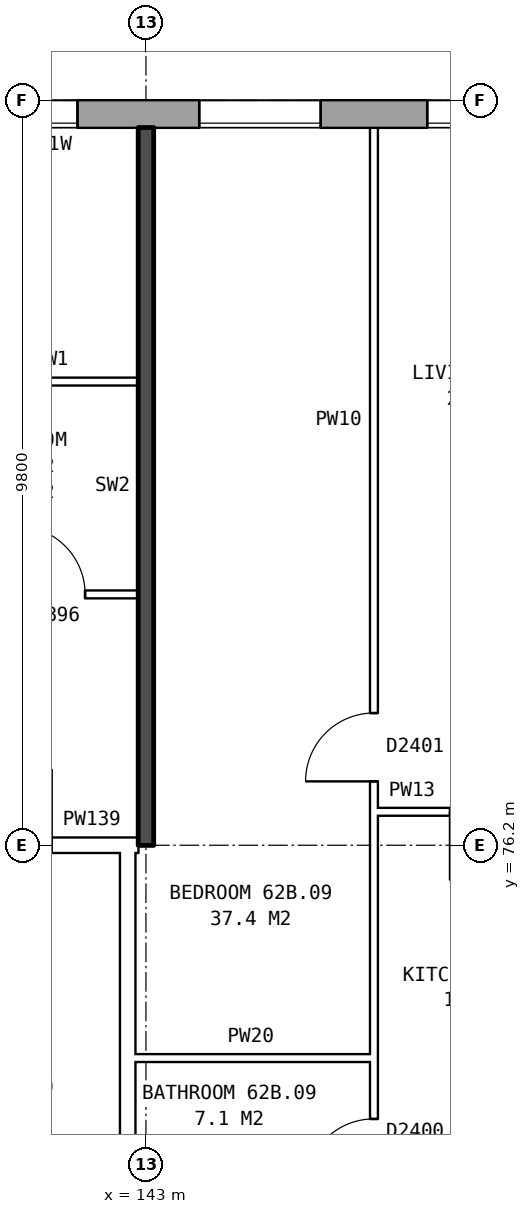
"""IFC4 building model, lengths in metres.
Left out: names, types, materials, properties, quantities, classifications, styles, units other than length and angle.
Written with IfcOpenShell. Run it as: python <this file> out.ifc"""

import sys

from ifc_helpers import new_model, si_unit, direction, frame, frame_2d, origin, place, context, subcontext, project, spatial, rectangle, extrude, element, fill, save


model = new_model("IFC4")
c1 = context("Model", 3, precision=1e-05, world=origin(), true_north=direction((0.0, 1.0)))
c2 = subcontext(c1, "Body", "Model", "MODEL_VIEW")
j1 = project(units=[si_unit("LENGTHUNIT", "METRE"), si_unit("PLANEANGLEUNIT", "RADIAN")], contexts=[c1])
p1 = place(None, origin())
s1 = spatial("IfcSite", under=j1, at=p1, CompositionType="ELEMENT")
p2 = place(p1, origin())
s2 = spatial("IfcBuilding", under=s1, at=p2, CompositionType="ELEMENT")
p3 = place(p2, frame((0.0, 0.0, 221.4)))
s3 = spatial("IfcBuildingStorey", under=s2, at=p3, CompositionType="ELEMENT", Elevation=221.4)
p4 = place(p3, frame((165.925, 85.82, 0.0), z_axis=(0.0, 0.0, 1.0), x_axis=(-1.0, 0.0, 0.0)))
e1 = element("IfcWall", 1, at=p4, inside=s3, PredefinedType="STANDARD", context=c2, shape_type="SweptSolid", body=[
    extrude(rectangle(XDim=33.875, YDim=0.36, at=frame_2d((16.938, 0.0))), origin(), (0.0, 0.0, 1.0), 2.85),
])
p5 = place(p4, frame((2.625, 0.0, 0.8)))
e2 = element("IfcOpeningElement", 2, at=p5, cuts=e1, PredefinedType="OPENING", context=c2, shape_type="SweptSolid", body=[
    extrude(rectangle(XDim=1.6, YDim=1.8, at=frame_2d((0.8, 0.9))), frame((0.0, 0.19, 0.0), z_axis=(0.0, -1.0, 0.0), x_axis=(1.0, 0.0, 0.0)), (0.0, 0.0, 1.0), 0.38),
])
p6 = place(p4, frame((5.625, 0.0, 0.8)))
e3 = element("IfcOpeningElement", 3, at=p6, cuts=e1, PredefinedType="OPENING", context=c2, shape_type="SweptSolid", body=[
    extrude(rectangle(XDim=1.6, YDim=1.8, at=frame_2d((0.8, 0.9))), frame((0.0, 0.19, 0.0), z_axis=(0.0, -1.0, 0.0), x_axis=(1.0, 0.0, 0.0)), (0.0, 0.0, 1.0), 0.38),
])
p7 = place(p4, frame((9.625, 0.0, 0.8)))
e4 = element("IfcOpeningElement", 4, at=p7, cuts=e1, PredefinedType="OPENING", context=c2, shape_type="SweptSolid", body=[
    extrude(rectangle(XDim=1.0, YDim=1.8, at=frame_2d((0.5, 0.9))), frame((0.0, 0.19, 0.0), z_axis=(0.0, -1.0, 0.0), x_axis=(1.0, 0.0, 0.0)), (0.0, 0.0, 1.0), 0.38),
])
p8 = place(p4, frame((11.625, 0.0, 0.8)))
e5 = element("IfcOpeningElement", 5, at=p8, cuts=e1, PredefinedType="OPENING", context=c2, shape_type="SweptSolid", body=[
    extrude(rectangle(XDim=1.6, YDim=1.8, at=frame_2d((0.8, 0.9))), frame((0.0, 0.19, 0.0), z_axis=(0.0, -1.0, 0.0), x_axis=(1.0, 0.0, 0.0)), (0.0, 0.0, 1.0), 0.38),
])
p9 = place(p4, frame((14.625, 0.0, 0.8)))
e6 = element("IfcOpeningElement", 6, at=p9, cuts=e1, PredefinedType="OPENING", context=c2, shape_type="SweptSolid", body=[
    extrude(rectangle(XDim=1.6, YDim=1.8, at=frame_2d((0.8, 0.9))), frame((0.0, 0.19, 0.0), z_axis=(0.0, -1.0, 0.0), x_axis=(1.0, 0.0, 0.0)), (0.0, 0.0, 1.0), 0.38),
])
p10 = place(p4, frame((17.625, 0.0, 0.8)))
e7 = element("IfcOpeningElement", 7, at=p10, cuts=e1, PredefinedType="OPENING", context=c2, shape_type="SweptSolid", body=[
    extrude(rectangle(XDim=1.6, YDim=1.8, at=frame_2d((0.8, 0.9))), frame((0.0, 0.19, 0.0), z_axis=(0.0, -1.0, 0.0), x_axis=(1.0, 0.0, 0.0)), (0.0, 0.0, 1.0), 0.38),
])
p11 = place(p4, frame((20.625, 0.0, 0.8)))
e8 = element("IfcOpeningElement", 8, at=p11, cuts=e1, PredefinedType="OPENING", context=c2, shape_type="SweptSolid", body=[
    extrude(rectangle(XDim=1.6, YDim=1.8, at=frame_2d((0.8, 0.9))), frame((0.0, 0.19, 0.0), z_axis=(0.0, -1.0, 0.0), x_axis=(1.0, 0.0, 0.0)), (0.0, 0.0, 1.0), 0.38),
])
p12 = place(p4, frame((23.825, 0.0, 1.7)))
e9 = element("IfcOpeningElement", 9, at=p12, cuts=e1, PredefinedType="OPENING", context=c2, shape_type="SweptSolid", body=[
    extrude(rectangle(XDim=0.6, YDim=0.9, at=frame_2d((0.3, 0.45))), frame((0.0, 0.19, 0.0), z_axis=(0.0, -1.0, 0.0), x_axis=(1.0, 0.0, 0.0)), (0.0, 0.0, 1.0), 0.38),
])
p13 = place(p4, frame((26.625, 0.0, 0.8)))
e10 = element("IfcOpeningElement", 10, at=p13, cuts=e1, PredefinedType="OPENING", context=c2, shape_type="SweptSolid", body=[
    extrude(rectangle(XDim=1.6, YDim=1.8, at=frame_2d((0.8, 0.9))), frame((0.0, 0.19, 0.0), z_axis=(0.0, -1.0, 0.0), x_axis=(1.0, 0.0, 0.0)), (0.0, 0.0, 1.0), 0.38),
])
p14 = place(p4, frame((29.625, 0.0, 0.8)))
e11 = element("IfcOpeningElement", 11, at=p14, cuts=e1, PredefinedType="OPENING", context=c2, shape_type="SweptSolid", body=[
    extrude(rectangle(XDim=1.6, YDim=1.8, at=frame_2d((0.8, 0.9))), frame((0.0, 0.19, 0.0), z_axis=(0.0, -1.0, 0.0), x_axis=(1.0, 0.0, 0.0)), (0.0, 0.0, 1.0), 0.38),
])
p15 = place(p4, frame((24.725, 0.0, 0.8)))
e12 = element("IfcOpeningElement", 12, at=p15, cuts=e1, PredefinedType="OPENING", context=c2, shape_type="SweptSolid", body=[
    extrude(rectangle(XDim=1.6, YDim=1.8, at=frame_2d((0.8, 0.9))), frame((0.0, 0.19, 0.0), z_axis=(0.0, -1.0, 0.0), x_axis=(1.0, 0.0, 0.0)), (0.0, 0.0, 1.0), 0.38),
])
p16 = place(p3, frame((142.76, 63.9, 0.0), z_axis=(0.0, 0.0, 1.0), x_axis=(0.0, 1.0, 0.0)))
e13 = element("IfcWall", 13, at=p16, inside=s3, PredefinedType="PARTITIONING", context=c2, shape_type="SweptSolid", body=[
    extrude(rectangle(XDim=12.2, YDim=0.2, at=frame_2d((6.1, 0.0))), origin(), (0.0, 0.0, 1.0), 2.85),
])
p17 = place(p16, frame((5.1, 0.0, 0.0)))
e14 = element("IfcOpeningElement", 14, at=p17, cuts=e13, PredefinedType="OPENING", context=c2, shape_type="SweptSolid", body=[
    extrude(rectangle(XDim=2.0, YDim=2.1, at=frame_2d((1.0, 1.05))), frame((0.0, 0.11, 0.0), z_axis=(0.0, -1.0, 0.0), x_axis=(1.0, 0.0, 0.0)), (0.0, 0.0, 1.0), 0.22),
])
p18 = place(p3, frame((142.76, 73.4, 0.0), z_axis=(0.0, 0.0, 1.0), x_axis=(1.0, 0.0, 0.0)))
e15 = element("IfcWall", 15, at=p18, inside=s3, PredefinedType="PARTITIONING", context=c2, shape_type="SweptSolid", body=[
    extrude(rectangle(XDim=3.24, YDim=0.1, at=frame_2d((1.62, 0.0))), origin(), (0.0, 0.0, 1.0), 2.85),
])
p19 = place(p3, frame((139.76, 76.2, 0.0), z_axis=(0.0, 0.0, 1.0), x_axis=(1.0, 0.0, 0.0)))
e16 = element("IfcWall", 16, at=p19, inside=s3, PredefinedType="PARTITIONING", context=c2, shape_type="SweptSolid", body=[
    extrude(rectangle(XDim=3.0, YDim=0.2, at=frame_2d((1.5, 0.0))), origin(), (0.0, 0.0, 1.0), 2.85),
])
p20 = place(p19, frame((1.0, 0.0, 0.0)))
e17 = element("IfcOpeningElement", 17, at=p20, cuts=e16, PredefinedType="OPENING", context=c2, shape_type="SweptSolid", body=[
    extrude(rectangle(XDim=1.0, YDim=2.1, at=frame_2d((0.5, 1.05))), frame((0.0, 0.11, 0.0), z_axis=(0.0, -1.0, 0.0), x_axis=(1.0, 0.0, 0.0)), (0.0, 0.0, 1.0), 0.22),
])
p21 = place(p3, frame((142.76, 76.2, 0.0), z_axis=(0.0, 0.0, 1.0), x_axis=(1.0, 0.0, 0.0)))
e18 = element("IfcWall", 18, at=p21, inside=s3, PredefinedType="PARTITIONING", context=c2, shape_type="SweptSolid", body=[
    extrude(rectangle(XDim=0.14, YDim=0.2, at=frame_2d((0.07, 0.0))), origin(), (0.0, 0.0, 1.0), 2.85),
])
p22 = place(p3, frame((146.0, 76.64, 0.0), z_axis=(0.0, 0.0, 1.0), x_axis=(1.0, 0.0, 0.0)))
e19 = element("IfcWall", 19, at=p22, inside=s3, PredefinedType="PARTITIONING", context=c2, shape_type="SweptSolid", body=[
    extrude(rectangle(XDim=2.9, YDim=0.1, at=frame_2d((1.45, 0.0))), origin(), (0.0, 0.0, 1.0), 2.85),
])
p23 = place(p22, frame((1.0, 0.0, 0.0)))
e20 = element("IfcOpeningElement", 20, at=p23, cuts=e19, PredefinedType="OPENING", context=c2, shape_type="SweptSolid", body=[
    extrude(rectangle(XDim=0.9, YDim=2.1, at=frame_2d((0.45, 1.05))), frame((0.0, 0.06, 0.0), z_axis=(0.0, -1.0, 0.0), x_axis=(1.0, 0.0, 0.0)), (0.0, 0.0, 1.0), 0.12),
])
p24 = place(p3, frame((131.1, 79.5, 0.0), z_axis=(0.0, 0.0, 1.0), x_axis=(1.0, 0.0, 0.0)))
e21 = element("IfcWall", 21, at=p24, inside=s3, PredefinedType="PARTITIONING", context=c2, shape_type="SweptSolid", body=[
    extrude(rectangle(XDim=11.8, YDim=0.1, at=frame_2d((5.9, 0.0))), origin(), (0.0, 0.0, 1.0), 2.85),
])
p25 = place(p24, frame((7.25, 0.0, 0.0)))
e22 = element("IfcOpeningElement", 22, at=p25, cuts=e21, PredefinedType="OPENING", context=c2, shape_type="SweptSolid", body=[
    extrude(rectangle(XDim=0.9, YDim=2.1, at=frame_2d((0.45, 1.05))), frame((0.0, 0.06, 0.0), z_axis=(0.0, -1.0, 0.0), x_axis=(1.0, 0.0, 0.0)), (0.0, 0.0, 1.0), 0.12),
])
p26 = place(p24, frame((10.2, 0.0, 0.0)))
e23 = element("IfcOpeningElement", 23, at=p26, cuts=e21, PredefinedType="OPENING", context=c2, shape_type="SweptSolid", body=[
    extrude(rectangle(XDim=0.9, YDim=2.1, at=frame_2d((0.45, 1.05))), frame((0.0, 0.06, 0.0), z_axis=(0.0, -1.0, 0.0), x_axis=(1.0, 0.0, 0.0)), (0.0, 0.0, 1.0), 0.12),
])
p27 = place(p3, frame((140.6, 82.3, 0.0), z_axis=(0.0, 0.0, 1.0), x_axis=(1.0, 0.0, 0.0)))
e24 = element("IfcWall", 24, at=p27, inside=s3, PredefinedType="PARTITIONING", context=c2, shape_type="SweptSolid", body=[
    extrude(rectangle(XDim=2.3, YDim=0.1, at=frame_2d((1.15, 0.0))), origin(), (0.0, 0.0, 1.0), 2.85),
])
p28 = place(p3, frame((143.0, 76.2, 0.0), z_axis=(0.0, 0.0, 1.0), x_axis=(0.0, 1.0, 0.0)))
e25 = element("IfcWall", 25, at=p28, inside=s3, PredefinedType="SOLIDWALL", context=c2, shape_type="SweptSolid", body=[
    extrude(rectangle(XDim=9.44, YDim=0.2, at=frame_2d((4.72, 0.0))), origin(), (0.0, 0.0, 1.0), 2.85),
])
p29 = place(p3, frame((146.0, 71.3, 0.0), z_axis=(0.0, 0.0, 1.0), x_axis=(0.0, 1.0, 0.0)))
e26 = element("IfcWall", 26, at=p29, inside=s3, PredefinedType="PARTITIONING", context=c2, shape_type="SweptSolid", body=[
    extrude(rectangle(XDim=14.34, YDim=0.1, at=frame_2d((7.17, 0.0))), origin(), (0.0, 0.0, 1.0), 2.85),
])
p30 = place(p29, frame((5.74, 0.0, 0.0)))
e27 = element("IfcOpeningElement", 27, at=p30, cuts=e26, PredefinedType="OPENING", context=c2, shape_type="SweptSolid", body=[
    extrude(rectangle(XDim=0.9, YDim=2.1, at=frame_2d((0.45, 1.05))), frame((0.0, 0.06, 0.0), z_axis=(0.0, -1.0, 0.0), x_axis=(1.0, 0.0, 0.0)), (0.0, 0.0, 1.0), 0.12),
])
p31 = place(p29, frame((0.4, 0.0, 0.0)))
e28 = element("IfcOpeningElement", 28, at=p31, cuts=e26, PredefinedType="OPENING", context=c2, shape_type="SweptSolid", body=[
    extrude(rectangle(XDim=0.9, YDim=2.1, at=frame_2d((0.45, 1.05))), frame((0.0, 0.06, 0.0), z_axis=(0.0, -1.0, 0.0), x_axis=(1.0, 0.0, 0.0)), (0.0, 0.0, 1.0), 0.12),
])
p32 = place(p10, origin())
e29 = element("IfcWindow", 29, at=p32, inside=s3, PartitioningType="SINGLE_PANEL", PredefinedType="WINDOW", context=c2, shape_type="SweptSolid", body=[
    extrude(rectangle(XDim=1.6, YDim=1.8, at=frame_2d((0.8, 0.9))), frame((0.0, 0.15, 0.0), z_axis=(0.0, -1.0, 0.0), x_axis=(1.0, 0.0, 0.0)), (0.0, 0.0, 1.0), 0.06),
])
fill(e7, e29)
p33 = place(p11, origin())
e30 = element("IfcWindow", 30, at=p33, inside=s3, PartitioningType="SINGLE_PANEL", PredefinedType="WINDOW", context=c2, shape_type="SweptSolid", body=[
    extrude(rectangle(XDim=1.6, YDim=1.8, at=frame_2d((0.8, 0.9))), frame((0.0, 0.15, 0.0), z_axis=(0.0, -1.0, 0.0), x_axis=(1.0, 0.0, 0.0)), (0.0, 0.0, 1.0), 0.06),
])
fill(e8, e30)
p34 = place(p12, origin())
e31 = element("IfcWindow", 31, at=p34, inside=s3, PartitioningType="SINGLE_PANEL", PredefinedType="WINDOW", context=c2, shape_type="SweptSolid", body=[
    extrude(rectangle(XDim=0.6, YDim=0.9, at=frame_2d((0.3, 0.45))), frame((0.0, 0.15, 0.0), z_axis=(0.0, -1.0, 0.0), x_axis=(1.0, 0.0, 0.0)), (0.0, 0.0, 1.0), 0.06),
])
fill(e9, e31)
p35 = place(p26, origin())
e32 = element("IfcDoor", 32, at=p35, inside=s3, OperationType="SINGLE_SWING_LEFT", PredefinedType="DOOR", context=c2, shape_type="SweptSolid", body=[
    extrude(rectangle(XDim=0.9, YDim=2.1, at=frame_2d((0.45, 1.05))), frame((0.0, 0.025, 0.0), z_axis=(0.0, -1.0, 0.0), x_axis=(1.0, 0.0, 0.0)), (0.0, 0.0, 1.0), 0.05),
])
fill(e23, e32)
p36 = place(p30, origin())
e33 = element("IfcDoor", 33, at=p36, inside=s3, OperationType="SINGLE_SWING_LEFT", PredefinedType="DOOR", context=c2, shape_type="SweptSolid", body=[
    extrude(rectangle(XDim=0.9, YDim=2.1, at=frame_2d((0.45, 1.05))), frame((0.0, 0.025, 0.0), z_axis=(0.0, -1.0, 0.0), x_axis=(1.0, 0.0, 0.0)), (0.0, 0.0, 1.0), 0.05),
])
fill(e27, e33)
p37 = place(p31, origin())
e34 = element("IfcDoor", 34, at=p37, inside=s3, OperationType="SINGLE_SWING_LEFT", PredefinedType="DOOR", context=c2, shape_type="SweptSolid", body=[
    extrude(rectangle(XDim=0.9, YDim=2.1, at=frame_2d((0.45, 1.05))), frame((0.0, 0.025, 0.0), z_axis=(0.0, -1.0, 0.0), x_axis=(1.0, 0.0, 0.0)), (0.0, 0.0, 1.0), 0.05),
])
fill(e28, e34)
save(model, sys.argv[1])
